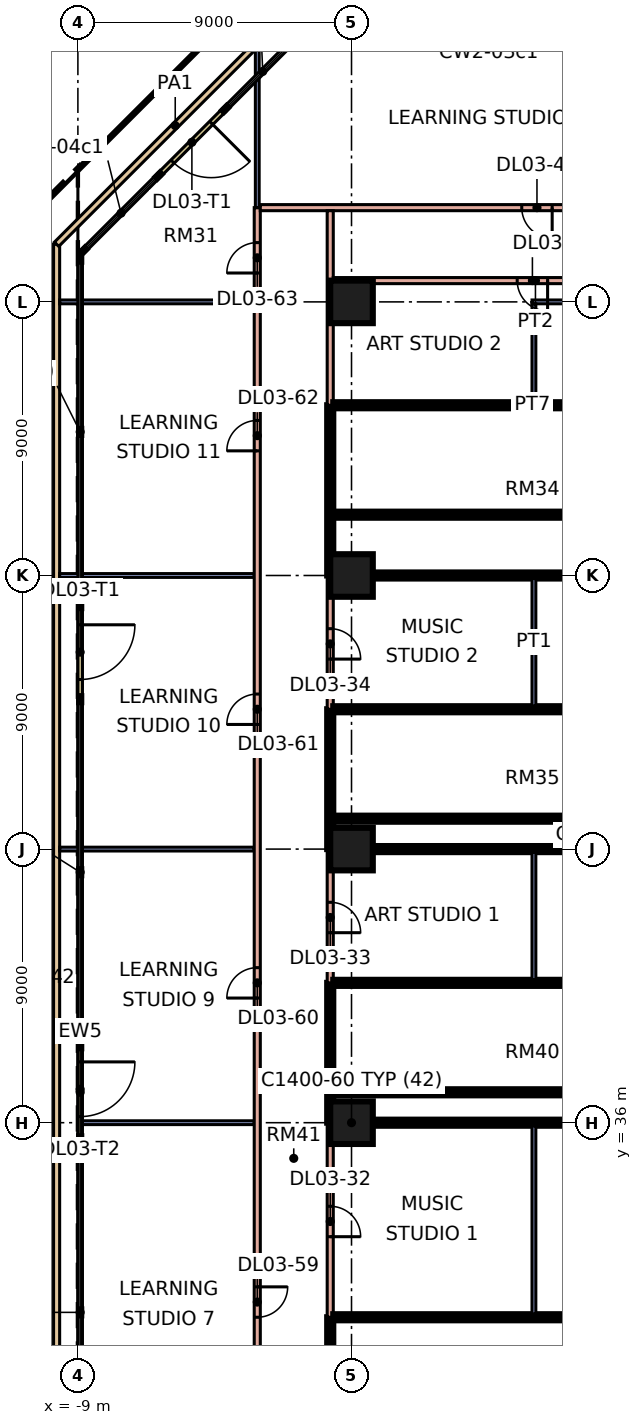
"""IFC4 building model, lengths in metres.
Left out: names, types, materials, properties, quantities, classifications, styles, units other than length and angle.
Written with IfcOpenShell. Run it as: python <this file> out.ifc"""

import sys

from ifc_helpers import new_model, si_unit, direction, frame, frame_2d, origin, origin_2d, place, context, subcontext, project, spatial, rectangle, extrude, element, fill, save


model = new_model("IFC4")
c1 = context("Model", 3, precision=1e-05, world=origin(), true_north=direction((0.0, 1.0)))
c2 = subcontext(c1, "Body", "Model", "MODEL_VIEW")
j1 = project(units=[si_unit("LENGTHUNIT", "METRE"), si_unit("PLANEANGLEUNIT", "RADIAN")], contexts=[c1])
p1 = place(None, origin())
s1 = spatial("IfcSite", under=j1, at=p1, CompositionType="ELEMENT")
p2 = place(p1, origin())
s2 = spatial("IfcBuilding", under=s1, at=p2, CompositionType="ELEMENT")
p3 = place(p2, frame((0.0, 0.0, 16.8)))
s3 = spatial("IfcBuildingStorey", under=s2, at=p3, CompositionType="ELEMENT", Elevation=16.8)
for number, where, z_axis, x_axis in (
    (1, (0.0, 36.0, 0.0), (0.0, 0.0, 1.0), (1.0, 0.0, 0.0)),
    (2, (0.0, 45.0, 0.0), (0.0, 0.0, 1.0), (1.0, 0.0, 0.0)),
    (3, (0.0, 54.0, 0.0), (0.0, 0.0, 1.0), (1.0, 0.0, 0.0)),
    (4, (0.0, 63.0, 0.0), (0.0, 0.0, 1.0), (1.0, 0.0, 0.0)),
):
    element("IfcColumn", number, at=place(p3, frame(where, z_axis=z_axis, x_axis=x_axis)), inside=s3, PredefinedType="COLUMN", context=c2, shape_type="SweptSolid", body=[
        extrude(rectangle(XDim=1.4, YDim=1.4, at=origin_2d()), origin(), (0.0, 0.0, 1.0), 4.8),
    ])
p4 = place(p3, frame((-4.19, 69.311, 0.0), z_axis=(0.0, 0.0, 1.0), x_axis=(-0.707106781187, -0.707106781187, 0.0)))
e5 = element("IfcWall", 5, at=p4, inside=s3, PredefinedType="SOLIDWALL", context=c2, shape_type="SweptSolid", body=[
    extrude(rectangle(XDim=3.0, YDim=0.15, at=frame_2d((1.5, 0.0))), origin(), (0.0, 0.0, 1.0), 4.4),
])
p5 = place(p4, frame((0.6, 0.0, 0.0)))
e6 = element("IfcOpeningElement", 6, at=p5, cuts=e5, PredefinedType="OPENING", context=c2, shape_type="SweptSolid", body=[
    extrude(rectangle(XDim=1.8, YDim=2.4, at=frame_2d((0.9, 1.2))), frame((0.0, 0.085, 0.0), z_axis=(0.0, -1.0, 0.0), x_axis=(1.0, 0.0, 0.0)), (0.0, 0.0, 1.0), 0.17),
])
p6 = place(p3, frame((-8.925, 52.978, 0.0), z_axis=(0.0, 0.0, 1.0), x_axis=(0.0, -1.0, 0.0)))
e7 = element("IfcWall", 7, at=p6, inside=s3, PredefinedType="SOLIDWALL", context=c2, shape_type="SweptSolid", body=[
    extrude(rectangle(XDim=3.0, YDim=0.15, at=frame_2d((1.5, 0.0))), origin(), (0.0, 0.0, 1.0), 4.4),
])
p7 = place(p6, frame((0.6, 0.0, 0.0)))
e8 = element("IfcOpeningElement", 8, at=p7, cuts=e7, PredefinedType="OPENING", context=c2, shape_type="SweptSolid", body=[
    extrude(rectangle(XDim=1.8, YDim=2.4, at=frame_2d((0.9, 1.2))), frame((0.0, 0.085, 0.0), z_axis=(0.0, -1.0, 0.0), x_axis=(1.0, 0.0, 0.0)), (0.0, 0.0, 1.0), 0.17),
])
p8 = place(p3, frame((-8.925, 38.5, 0.0), z_axis=(0.0, 0.0, 1.0), x_axis=(0.0, -1.0, 0.0)))
e9 = element("IfcWall", 9, at=p8, inside=s3, PredefinedType="SOLIDWALL", context=c2, shape_type="SweptSolid", body=[
    extrude(rectangle(XDim=3.0, YDim=0.15, at=frame_2d((1.5, 0.0))), origin(), (0.0, 0.0, 1.0), 4.4),
])
p9 = place(p8, frame((0.5, 0.0, 0.0)))
e10 = element("IfcOpeningElement", 10, at=p9, cuts=e9, PredefinedType="OPENING", context=c2, shape_type="SweptSolid", body=[
    extrude(rectangle(XDim=1.8, YDim=2.4, at=frame_2d((0.9, 1.2))), frame((0.0, 0.085, 0.0), z_axis=(0.0, -1.0, 0.0), x_axis=(1.0, 0.0, 0.0)), (0.0, 0.0, 1.0), 0.17),
])
p10 = place(p3, frame((-9.7, 9.104, 0.0), z_axis=(0.0, 0.0, 1.0), x_axis=(0.0, 1.0, 0.0)))
e11 = element("IfcWall", 11, at=p10, inside=s3, PredefinedType="PARAPET", context=c2, shape_type="SweptSolid", body=[
    extrude(rectangle(XDim=55.793, YDim=0.2, at=frame_2d((27.896, 0.0))), origin(), (0.0, 0.0, 1.0), 0.5),
])
p11 = place(p3, frame((-9.7, 64.896, 0.0), z_axis=(0.0, 0.0, 1.0), x_axis=(0.707106781187, 0.707106781187, 0.0)))
e12 = element("IfcWall", 12, at=p11, inside=s3, PredefinedType="PARAPET", context=c2, shape_type="SweptSolid", body=[
    extrude(rectangle(XDim=11.036, YDim=0.2, at=frame_2d((5.518, 0.0))), origin(), (0.0, 0.0, 1.0), 0.5),
])
for number, where, z_axis, x_axis in (
    (13, (-9.6, 45.0, 0.0), (0.0, 0.0, 1.0), (1.0, 0.0, 0.0)),
    (14, (-9.6, 54.0, 0.0), (0.0, 0.0, 1.0), (1.0, 0.0, 0.0)),
    (15, (-9.6, 63.0, 0.0), (0.0, 0.0, 1.0), (1.0, 0.0, 0.0)),
):
    element("IfcWall", number, at=place(p3, frame(where, z_axis=z_axis, x_axis=x_axis)), inside=s3, PredefinedType="PARTITIONING", context=c2, shape_type="SweptSolid", body=[
        extrude(rectangle(XDim=6.4, YDim=0.125, at=frame_2d((3.2, 0.0))), origin(), (0.0, 0.0, 1.0), 4.4),
    ])
p12 = place(p3, frame((-8.851, 36.0, 0.0), z_axis=(0.0, 0.0, 1.0), x_axis=(1.0, 0.0, 0.0)))
e16 = element("IfcWall", 16, at=p12, inside=s3, PredefinedType="PARTITIONING", context=c2, shape_type="SweptSolid", body=[
    extrude(rectangle(XDim=5.651, YDim=0.125, at=frame_2d((2.826, 0.0))), origin(), (0.0, 0.0, 1.0), 4.4),
])
p13 = place(p3, frame((-3.1, 2.645, 0.0), z_axis=(0.0, 0.0, 1.0), x_axis=(0.0, 1.0, 0.0)))
e17 = element("IfcWall", 17, at=p13, inside=s3, PredefinedType="PARTITIONING", context=c2, shape_type="SweptSolid", body=[
    extrude(rectangle(XDim=63.455, YDim=0.2, at=frame_2d((31.728, 0.0))), origin(), (0.0, 0.0, 1.0), 4.4),
])
p14 = place(p13, frame((4.705, 0.0, 0.0)))
e18 = element("IfcOpeningElement", 18, at=p14, cuts=e17, PredefinedType="OPENING", context=c2, shape_type="SweptSolid", body=[
    extrude(rectangle(XDim=1.0, YDim=2.1, at=frame_2d((0.5, 1.05))), frame((0.0, 0.11, 0.0), z_axis=(0.0, -1.0, 0.0), x_axis=(1.0, 0.0, 0.0)), (0.0, 0.0, 1.0), 0.22),
])
p15 = place(p13, frame((14.955, 0.0, 0.0)))
e19 = element("IfcOpeningElement", 19, at=p15, cuts=e17, PredefinedType="OPENING", context=c2, shape_type="SweptSolid", body=[
    extrude(rectangle(XDim=1.0, YDim=2.1, at=frame_2d((0.5, 1.05))), frame((0.0, 0.11, 0.0), z_axis=(0.0, -1.0, 0.0), x_axis=(1.0, 0.0, 0.0)), (0.0, 0.0, 1.0), 0.22),
])
p16 = place(p13, frame((26.955, 0.0, 0.0)))
e20 = element("IfcOpeningElement", 20, at=p16, cuts=e17, PredefinedType="OPENING", context=c2, shape_type="SweptSolid", body=[
    extrude(rectangle(XDim=1.0, YDim=2.1, at=frame_2d((0.5, 1.05))), frame((0.0, 0.11, 0.0), z_axis=(0.0, -1.0, 0.0), x_axis=(1.0, 0.0, 0.0)), (0.0, 0.0, 1.0), 0.22),
])
p17 = place(p13, frame((37.455, 0.0, 0.0)))
e21 = element("IfcOpeningElement", 21, at=p17, cuts=e17, PredefinedType="OPENING", context=c2, shape_type="SweptSolid", body=[
    extrude(rectangle(XDim=1.0, YDim=2.1, at=frame_2d((0.5, 1.05))), frame((0.0, 0.11, 0.0), z_axis=(0.0, -1.0, 0.0), x_axis=(1.0, 0.0, 0.0)), (0.0, 0.0, 1.0), 0.22),
])
p18 = place(p13, frame((46.455, 0.0, 0.0)))
e22 = element("IfcOpeningElement", 22, at=p18, cuts=e17, PredefinedType="OPENING", context=c2, shape_type="SweptSolid", body=[
    extrude(rectangle(XDim=1.0, YDim=2.1, at=frame_2d((0.5, 1.05))), frame((0.0, 0.11, 0.0), z_axis=(0.0, -1.0, 0.0), x_axis=(1.0, 0.0, 0.0)), (0.0, 0.0, 1.0), 0.22),
])
p19 = place(p13, frame((55.455, 0.0, 0.0)))
e23 = element("IfcOpeningElement", 23, at=p19, cuts=e17, PredefinedType="OPENING", context=c2, shape_type="SweptSolid", body=[
    extrude(rectangle(XDim=1.0, YDim=2.1, at=frame_2d((0.5, 1.05))), frame((0.0, 0.11, 0.0), z_axis=(0.0, -1.0, 0.0), x_axis=(1.0, 0.0, 0.0)), (0.0, 0.0, 1.0), 0.22),
])
p20 = place(p13, frame((61.305, 0.0, 0.0)))
e24 = element("IfcOpeningElement", 24, at=p20, cuts=e17, PredefinedType="OPENING", context=c2, shape_type="SweptSolid", body=[
    extrude(rectangle(XDim=1.0, YDim=2.1, at=frame_2d((0.5, 1.05))), frame((0.0, 0.11, 0.0), z_axis=(0.0, -1.0, 0.0), x_axis=(1.0, 0.0, 0.0)), (0.0, 0.0, 1.0), 0.22),
])
p21 = place(p3, frame((-3.1, 66.1, 0.0), z_axis=(0.0, 0.0, 1.0), x_axis=(0.0, 1.0, 0.0)))
e25 = element("IfcWall", 25, at=p21, inside=s3, PredefinedType="PARTITIONING", context=c2, shape_type="SweptSolid", body=[
    extrude(rectangle(XDim=5.255, YDim=0.125, at=frame_2d((2.627, 0.0))), origin(), (0.0, 0.0, 1.0), 4.4),
])
p22 = place(p3, frame((-3.0, 66.1, 0.0), z_axis=(0.0, 0.0, 1.0), x_axis=(1.0, 0.0, 0.0)))
e26 = element("IfcWall", 26, at=p22, inside=s3, PredefinedType="PARTITIONING", context=c2, shape_type="SweptSolid", body=[
    extrude(rectangle(XDim=30.0, YDim=0.2, at=frame_2d((15.0, 0.0))), origin(), (0.0, 0.0, 1.0), 4.4),
])
p23 = place(p22, frame((8.6, 0.0, 0.0)))
e27 = element("IfcOpeningElement", 27, at=p23, cuts=e26, PredefinedType="OPENING", context=c2, shape_type="SweptSolid", body=[
    extrude(rectangle(XDim=1.0, YDim=2.1, at=frame_2d((0.5, 1.05))), frame((0.0, 0.11, 0.0), z_axis=(0.0, -1.0, 0.0), x_axis=(1.0, 0.0, 0.0)), (0.0, 0.0, 1.0), 0.22),
])
p24 = place(p22, frame((22.35, 0.0, 0.0)))
e28 = element("IfcOpeningElement", 28, at=p24, cuts=e26, PredefinedType="OPENING", context=c2, shape_type="SweptSolid", body=[
    extrude(rectangle(XDim=1.0, YDim=2.1, at=frame_2d((0.5, 1.05))), frame((0.0, 0.11, 0.0), z_axis=(0.0, -1.0, 0.0), x_axis=(1.0, 0.0, 0.0)), (0.0, 0.0, 1.0), 0.22),
])
p25 = place(p3, frame((-0.7, 23.0, 0.0), z_axis=(0.0, 0.0, 1.0), x_axis=(0.0, 1.0, 0.0)))
e29 = element("IfcWall", 29, at=p25, inside=s3, PredefinedType="SOLIDWALL", context=c2, shape_type="SweptSolid", body=[
    extrude(rectangle(XDim=6.6, YDim=0.2, at=frame_2d((3.3, 0.0))), origin(), (0.0, 0.0, 1.0), 4.4),
])
p26 = place(p3, frame((-0.7, 29.6, 0.0), z_axis=(0.0, 0.0, 1.0), x_axis=(0.0, 1.0, 0.0)))
e30 = element("IfcWall", 30, at=p26, inside=s3, PredefinedType="PARTITIONING", context=c2, shape_type="SweptSolid", body=[
    extrude(rectangle(XDim=6.4, YDim=0.2, at=frame_2d((3.2, 0.0))), origin(), (0.0, 0.0, 1.0), 4.4),
])
p27 = place(p26, frame((2.65, 0.0, 0.0)))
e31 = element("IfcOpeningElement", 31, at=p27, cuts=e30, PredefinedType="OPENING", context=c2, shape_type="SweptSolid", body=[
    extrude(rectangle(XDim=1.0, YDim=2.1, at=frame_2d((0.5, 1.05))), frame((0.0, 0.11, 0.0), z_axis=(0.0, -1.0, 0.0), x_axis=(1.0, 0.0, 0.0)), (0.0, 0.0, 1.0), 0.22),
])
p28 = place(p3, frame((-0.7, 36.0, 0.0), z_axis=(0.0, 0.0, 1.0), x_axis=(0.0, 1.0, 0.0)))
e32 = element("IfcWall", 32, at=p28, inside=s3, PredefinedType="SOLIDWALL", context=c2, shape_type="SweptSolid", body=[
    extrude(rectangle(XDim=4.6, YDim=0.2, at=frame_2d((2.3, 0.0))), origin(), (0.0, 0.0, 1.0), 4.4),
])
p29 = place(p3, frame((-0.7, 40.6, 0.0), z_axis=(0.0, 0.0, 1.0), x_axis=(0.0, 1.0, 0.0)))
e33 = element("IfcWall", 33, at=p29, inside=s3, PredefinedType="PARTITIONING", context=c2, shape_type="SweptSolid", body=[
    extrude(rectangle(XDim=4.4, YDim=0.2, at=frame_2d((2.2, 0.0))), origin(), (0.0, 0.0, 1.0), 4.4),
])
p30 = place(p29, frame((1.65, 0.0, 0.0)))
e34 = element("IfcOpeningElement", 34, at=p30, cuts=e33, PredefinedType="OPENING", context=c2, shape_type="SweptSolid", body=[
    extrude(rectangle(XDim=1.0, YDim=2.1, at=frame_2d((0.5, 1.05))), frame((0.0, 0.11, 0.0), z_axis=(0.0, -1.0, 0.0), x_axis=(1.0, 0.0, 0.0)), (0.0, 0.0, 1.0), 0.22),
])
p31 = place(p3, frame((-0.7, 45.0, 0.0), z_axis=(0.0, 0.0, 1.0), x_axis=(0.0, 1.0, 0.0)))
e35 = element("IfcWall", 35, at=p31, inside=s3, PredefinedType="SOLIDWALL", context=c2, shape_type="SweptSolid", body=[
    extrude(rectangle(XDim=4.6, YDim=0.2, at=frame_2d((2.3, 0.0))), origin(), (0.0, 0.0, 1.0), 4.4),
])
p32 = place(p3, frame((-0.7, 49.6, 0.0), z_axis=(0.0, 0.0, 1.0), x_axis=(0.0, 1.0, 0.0)))
e36 = element("IfcWall", 36, at=p32, inside=s3, PredefinedType="PARTITIONING", context=c2, shape_type="SweptSolid", body=[
    extrude(rectangle(XDim=4.4, YDim=0.2, at=frame_2d((2.2, 0.0))), origin(), (0.0, 0.0, 1.0), 4.4),
])
p33 = place(p32, frame((1.65, 0.0, 0.0)))
e37 = element("IfcOpeningElement", 37, at=p33, cuts=e36, PredefinedType="OPENING", context=c2, shape_type="SweptSolid", body=[
    extrude(rectangle(XDim=1.0, YDim=2.1, at=frame_2d((0.5, 1.05))), frame((0.0, 0.11, 0.0), z_axis=(0.0, -1.0, 0.0), x_axis=(1.0, 0.0, 0.0)), (0.0, 0.0, 1.0), 0.22),
])
p34 = place(p3, frame((-0.7, 54.0, 0.0), z_axis=(0.0, 0.0, 1.0), x_axis=(0.0, 1.0, 0.0)))
e38 = element("IfcWall", 38, at=p34, inside=s3, PredefinedType="SOLIDWALL", context=c2, shape_type="SweptSolid", body=[
    extrude(rectangle(XDim=5.6, YDim=0.2, at=frame_2d((2.8, 0.0))), origin(), (0.0, 0.0, 1.0), 4.4),
])
p35 = place(p3, frame((-0.7, 59.6, 0.0), z_axis=(0.0, 0.0, 1.0), x_axis=(0.0, 1.0, 0.0)))
e39 = element("IfcWall", 39, at=p35, inside=s3, PredefinedType="PARTITIONING", context=c2, shape_type="SweptSolid", body=[
    extrude(rectangle(XDim=6.4, YDim=0.2, at=frame_2d((3.2, 0.0))), origin(), (0.0, 0.0, 1.0), 4.4),
])
for number, where, z_axis, x_axis in (
    (40, (-0.6, 29.6, 0.0), (0.0, 0.0, 1.0), (1.0, 0.0, 0.0)),
    (41, (-0.6, 36.0, 0.0), (0.0, 0.0, 1.0), (1.0, 0.0, 0.0)),
    (42, (-0.6, 40.6, 0.0), (0.0, 0.0, 1.0), (1.0, 0.0, 0.0)),
    (43, (-0.6, 45.0, 0.0), (0.0, 0.0, 1.0), (1.0, 0.0, 0.0)),
    (44, (-0.6, 49.6, 0.0), (0.0, 0.0, 1.0), (1.0, 0.0, 0.0)),
    (45, (-0.6, 54.0, 0.0), (0.0, 0.0, 1.0), (1.0, 0.0, 0.0)),
    (46, (-0.6, 59.6, 0.0), (0.0, 0.0, 1.0), (1.0, 0.0, 0.0)),
):
    element("IfcWall", number, at=place(p3, frame(where, z_axis=z_axis, x_axis=x_axis)), inside=s3, PredefinedType="SOLIDWALL", context=c2, shape_type="SweptSolid", body=[
        extrude(rectangle(XDim=13.1, YDim=0.2, at=frame_2d((6.55, 0.0))), origin(), (0.0, 0.0, 1.0), 4.4),
    ])
p36 = place(p3, frame((-0.6, 63.7, 0.0), z_axis=(0.0, 0.0, 1.0), x_axis=(1.0, 0.0, 0.0)))
e47 = element("IfcWall", 47, at=p36, inside=s3, PredefinedType="PARTITIONING", context=c2, shape_type="SweptSolid", body=[
    extrude(rectangle(XDim=13.3, YDim=0.2, at=frame_2d((6.65, 0.0))), origin(), (0.0, 0.0, 1.0), 4.4),
])
p37 = place(p36, frame((6.05, 0.0, 0.0)))
e48 = element("IfcOpeningElement", 48, at=p37, cuts=e47, PredefinedType="OPENING", context=c2, shape_type="SweptSolid", body=[
    extrude(rectangle(XDim=1.0, YDim=2.1, at=frame_2d((0.5, 1.05))), frame((0.0, 0.11, 0.0), z_axis=(0.0, -1.0, 0.0), x_axis=(1.0, 0.0, 0.0)), (0.0, 0.0, 1.0), 0.22),
])
p38 = place(p3, frame((5.938, 63.0, 0.0), z_axis=(0.0, 0.0, 1.0), x_axis=(1.0, 0.0, 0.0)))
e49 = element("IfcWall", 49, at=p38, inside=s3, PredefinedType="PARTITIONING", context=c2, shape_type="SweptSolid", body=[
    extrude(rectangle(XDim=6.562, YDim=0.125, at=frame_2d((3.281, 0.0))), origin(), (0.0, 0.0, 1.0), 4.4),
])
p39 = place(p3, frame((6.0, 29.7, 0.0), z_axis=(0.0, 0.0, 1.0), x_axis=(0.0, 1.0, 0.0)))
e50 = element("IfcWall", 50, at=p39, inside=s3, PredefinedType="PARTITIONING", context=c2, shape_type="SweptSolid", body=[
    extrude(rectangle(XDim=6.2, YDim=0.125, at=frame_2d((3.1, 0.0))), origin(), (0.0, 0.0, 1.0), 4.4),
])
for number, where, z_axis, x_axis in (
    (51, (6.0, 40.7, 0.0), (0.0, 0.0, 1.0), (0.0, 1.0, 0.0)),
    (52, (6.0, 49.7, 0.0), (0.0, 0.0, 1.0), (0.0, 1.0, 0.0)),
):
    element("IfcWall", number, at=place(p3, frame(where, z_axis=z_axis, x_axis=x_axis)), inside=s3, PredefinedType="PARTITIONING", context=c2, shape_type="SweptSolid", body=[
        extrude(rectangle(XDim=4.2, YDim=0.125, at=frame_2d((2.1, 0.0))), origin(), (0.0, 0.0, 1.0), 4.4),
    ])
p40 = place(p3, frame((6.0, 59.7, 0.0), z_axis=(0.0, 0.0, 1.0), x_axis=(0.0, 1.0, 0.0)))
e53 = element("IfcWall", 53, at=p40, inside=s3, PredefinedType="PARTITIONING", context=c2, shape_type="SweptSolid", body=[
    extrude(rectangle(XDim=3.238, YDim=0.125, at=frame_2d((1.619, 0.0))), origin(), (0.0, 0.0, 1.0), 4.4),
])
for number, where, z_axis, x_axis in (
    (54, (-0.6, 56.0, 0.0), (0.0, 0.0, 1.0), (1.0, 0.0, 0.0)),
    (55, (-0.6, 46.0, 0.0), (0.0, 0.0, 1.0), (1.0, 0.0, 0.0)),
    (56, (-0.6, 37.0, 0.0), (0.0, 0.0, 1.0), (1.0, 0.0, 0.0)),
):
    element("IfcWall", number, at=place(p3, frame(where, z_axis=z_axis, x_axis=x_axis)), inside=s3, PredefinedType="SOLIDWALL", context=c2, shape_type="SweptSolid", body=[
        extrude(rectangle(XDim=7.945, YDim=0.2, at=frame_2d((3.973, 0.0))), origin(), (0.0, 0.0, 1.0), 4.4),
    ])
p41 = place(p5, origin())
e57 = element("IfcDoor", 57, at=p41, inside=s3, OperationType="DOUBLE_DOOR_SINGLE_SWING", PredefinedType="DOOR", context=c2, shape_type="SweptSolid", body=[
    extrude(rectangle(XDim=1.8, YDim=2.4, at=frame_2d((0.9, 1.2))), frame((0.0, 0.025, 0.0), z_axis=(0.0, -1.0, 0.0), x_axis=(1.0, 0.0, 0.0)), (0.0, 0.0, 1.0), 0.05),
])
fill(e6, e57)
p42 = place(p7, origin())
e58 = element("IfcDoor", 58, at=p42, inside=s3, OperationType="DOUBLE_DOOR_SINGLE_SWING", PredefinedType="DOOR", context=c2, shape_type="SweptSolid", body=[
    extrude(rectangle(XDim=1.8, YDim=2.4, at=frame_2d((0.9, 1.2))), frame((0.0, 0.025, 0.0), z_axis=(0.0, -1.0, 0.0), x_axis=(1.0, 0.0, 0.0)), (0.0, 0.0, 1.0), 0.05),
])
fill(e8, e58)
p43 = place(p9, origin())
e59 = element("IfcDoor", 59, at=p43, inside=s3, OperationType="DOUBLE_DOOR_SINGLE_SWING", PredefinedType="DOOR", context=c2, shape_type="SweptSolid", body=[
    extrude(rectangle(XDim=1.8, YDim=2.4, at=frame_2d((0.9, 1.2))), frame((0.0, 0.025, 0.0), z_axis=(0.0, -1.0, 0.0), x_axis=(1.0, 0.0, 0.0)), (0.0, 0.0, 1.0), 0.05),
])
fill(e10, e59)
p44 = place(p27, frame((1.0, 0.0, 0.0), z_axis=(0.0, 0.0, 1.0), x_axis=(-1.0, 0.0, 0.0)))
e60 = element("IfcDoor", 60, at=p44, inside=s3, OperationType="SINGLE_SWING_LEFT", PredefinedType="DOOR", context=c2, shape_type="SweptSolid", body=[
    extrude(rectangle(XDim=1.0, YDim=2.1, at=frame_2d((0.5, 1.05))), frame((0.0, 0.025, 0.0), z_axis=(0.0, -1.0, 0.0), x_axis=(1.0, 0.0, 0.0)), (0.0, 0.0, 1.0), 0.05),
])
fill(e31, e60)
p45 = place(p30, frame((1.0, 0.0, 0.0), z_axis=(0.0, 0.0, 1.0), x_axis=(-1.0, 0.0, 0.0)))
e61 = element("IfcDoor", 61, at=p45, inside=s3, OperationType="SINGLE_SWING_LEFT", PredefinedType="DOOR", context=c2, shape_type="SweptSolid", body=[
    extrude(rectangle(XDim=1.0, YDim=2.1, at=frame_2d((0.5, 1.05))), frame((0.0, 0.025, 0.0), z_axis=(0.0, -1.0, 0.0), x_axis=(1.0, 0.0, 0.0)), (0.0, 0.0, 1.0), 0.05),
])
fill(e34, e61)
p46 = place(p33, frame((1.0, 0.0, 0.0), z_axis=(0.0, 0.0, 1.0), x_axis=(-1.0, 0.0, 0.0)))
e62 = element("IfcDoor", 62, at=p46, inside=s3, OperationType="SINGLE_SWING_LEFT", PredefinedType="DOOR", context=c2, shape_type="SweptSolid", body=[
    extrude(rectangle(XDim=1.0, YDim=2.1, at=frame_2d((0.5, 1.05))), frame((0.0, 0.025, 0.0), z_axis=(0.0, -1.0, 0.0), x_axis=(1.0, 0.0, 0.0)), (0.0, 0.0, 1.0), 0.05),
])
fill(e37, e62)
p47 = place(p37, origin())
e63 = element("IfcDoor", 63, at=p47, inside=s3, OperationType="SINGLE_SWING_RIGHT", PredefinedType="DOOR", context=c2, shape_type="SweptSolid", body=[
    extrude(rectangle(XDim=1.0, YDim=2.1, at=frame_2d((0.5, 1.05))), frame((0.0, 0.025, 0.0), z_axis=(0.0, -1.0, 0.0), x_axis=(1.0, 0.0, 0.0)), (0.0, 0.0, 1.0), 0.05),
])
fill(e48, e63)
p48 = place(p23, origin())
e64 = element("IfcDoor", 64, at=p48, inside=s3, OperationType="SINGLE_SWING_RIGHT", PredefinedType="DOOR", context=c2, shape_type="SweptSolid", body=[
    extrude(rectangle(XDim=1.0, YDim=2.1, at=frame_2d((0.5, 1.05))), frame((0.0, 0.025, 0.0), z_axis=(0.0, -1.0, 0.0), x_axis=(1.0, 0.0, 0.0)), (0.0, 0.0, 1.0), 0.05),
])
fill(e27, e64)
p49 = place(p16, origin())
e65 = element("IfcDoor", 65, at=p49, inside=s3, OperationType="SINGLE_SWING_RIGHT", PredefinedType="DOOR", context=c2, shape_type="SweptSolid", body=[
    extrude(rectangle(XDim=1.0, YDim=2.1, at=frame_2d((0.5, 1.05))), frame((0.0, 0.025, 0.0), z_axis=(0.0, -1.0, 0.0), x_axis=(1.0, 0.0, 0.0)), (0.0, 0.0, 1.0), 0.05),
])
fill(e20, e65)
p50 = place(p17, origin())
e66 = element("IfcDoor", 66, at=p50, inside=s3, OperationType="SINGLE_SWING_LEFT", PredefinedType="DOOR", context=c2, shape_type="SweptSolid", body=[
    extrude(rectangle(XDim=1.0, YDim=2.1, at=frame_2d((0.5, 1.05))), frame((0.0, 0.025, 0.0), z_axis=(0.0, -1.0, 0.0), x_axis=(1.0, 0.0, 0.0)), (0.0, 0.0, 1.0), 0.05),
])
fill(e21, e66)
p51 = place(p18, origin())
e67 = element("IfcDoor", 67, at=p51, inside=s3, OperationType="SINGLE_SWING_LEFT", PredefinedType="DOOR", context=c2, shape_type="SweptSolid", body=[
    extrude(rectangle(XDim=1.0, YDim=2.1, at=frame_2d((0.5, 1.05))), frame((0.0, 0.025, 0.0), z_axis=(0.0, -1.0, 0.0), x_axis=(1.0, 0.0, 0.0)), (0.0, 0.0, 1.0), 0.05),
])
fill(e22, e67)
p52 = place(p19, origin())
e68 = element("IfcDoor", 68, at=p52, inside=s3, OperationType="SINGLE_SWING_LEFT", PredefinedType="DOOR", context=c2, shape_type="SweptSolid", body=[
    extrude(rectangle(XDim=1.0, YDim=2.1, at=frame_2d((0.5, 1.05))), frame((0.0, 0.025, 0.0), z_axis=(0.0, -1.0, 0.0), x_axis=(1.0, 0.0, 0.0)), (0.0, 0.0, 1.0), 0.05),
])
fill(e23, e68)
p53 = place(p20, origin())
e69 = element("IfcDoor", 69, at=p53, inside=s3, OperationType="SINGLE_SWING_LEFT", PredefinedType="DOOR", context=c2, shape_type="SweptSolid", body=[
    extrude(rectangle(XDim=1.0, YDim=2.1, at=frame_2d((0.5, 1.05))), frame((0.0, 0.025, 0.0), z_axis=(0.0, -1.0, 0.0), x_axis=(1.0, 0.0, 0.0)), (0.0, 0.0, 1.0), 0.05),
])
fill(e24, e69)
save(model, sys.argv[1])
